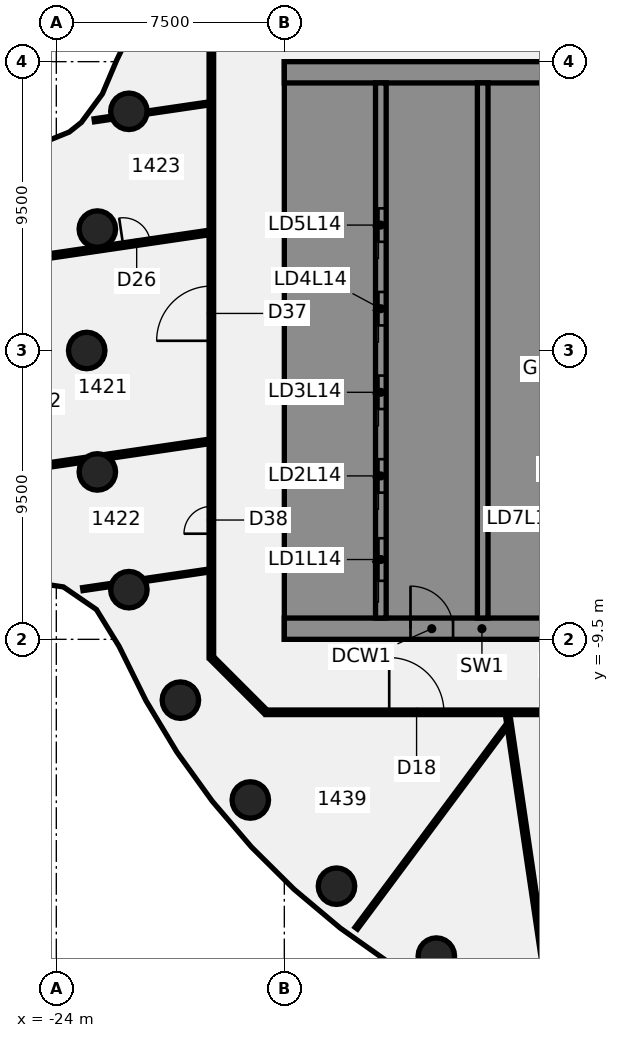
"""IFC4 building model, lengths in metres.
Left out: names, types, materials, properties, quantities, classifications, styles, units other than length and angle.
Written with IfcOpenShell. Run it as: python <this file> out.ifc"""

import sys

from ifc_helpers import new_model, si_unit, direction, frame, frame_2d, origin, origin_2d, place, context, subcontext, project, spatial, polyline, rectangle, circle, outline, extrude, element, fill, save


model = new_model("IFC4")
c1 = context("Model", 3, precision=1e-05, world=origin(), true_north=direction((0.0, 1.0)))
c2 = subcontext(c1, "Body", "Model", "MODEL_VIEW")
j1 = project(units=[si_unit("LENGTHUNIT", "METRE"), si_unit("PLANEANGLEUNIT", "RADIAN")], contexts=[c1])
p1 = place(None, origin())
s1 = spatial("IfcSite", under=j1, at=p1, CompositionType="ELEMENT")
p2 = place(p1, origin())
s2 = spatial("IfcBuilding", under=s1, at=p2, CompositionType="ELEMENT")
p3 = place(p2, frame((0.0, 0.0, 64.0)))
s3 = spatial("IfcBuildingStorey", under=s2, at=p3, CompositionType="ELEMENT", Elevation=64.0)
for number, where, z_axis, x_axis in (
    (1, (-21.613, 7.866, -0.14), (0.0, 0.0, 1.0), (1.0, 0.0, 0.0)),
    (2, (-22.651, 3.994, -0.14), (0.0, 0.0, 1.0), (1.0, 0.0, 0.0)),
    (3, (-23.0, 0.0, -0.14), (0.0, 0.0, 1.0), (1.0, 0.0, 0.0)),
    (4, (-22.651, -3.994, -0.14), (0.0, 0.0, 1.0), (1.0, 0.0, 0.0)),
    (5, (-21.613, -7.866, -0.14), (0.0, 0.0, 1.0), (1.0, 0.0, 0.0)),
    (6, (-19.919, -11.5, -0.14), (0.0, 0.0, 1.0), (1.0, 0.0, 0.0)),
    (7, (-17.619, -14.784, -0.14), (0.0, 0.0, 1.0), (1.0, 0.0, 0.0)),
    (8, (-14.784, -17.619, -0.14), (0.0, 0.0, 1.0), (1.0, 0.0, 0.0)),
    (9, (-11.5, -19.919, -0.14), (0.0, 0.0, 1.0), (1.0, 0.0, 0.0)),
):
    element("IfcColumn", number, at=place(p3, frame(where, z_axis=z_axis, x_axis=x_axis)), inside=s3, PredefinedType="COLUMN", context=c2, shape_type="SweptSolid", body=[
        extrude(circle(Radius=0.6, at=origin_2d()), origin(), (0.0, 0.0, 1.0), 3.75),
    ])
p4 = place(p3, frame((-9.156, -11.969, 0.0), z_axis=(0.0, 0.0, 1.0), x_axis=(0.145719234009, -0.989325985123, 0.0)))
e10 = element("IfcWall", 10, at=p4, inside=s3, PredefinedType="PARTITIONING", context=c2, shape_type="SweptSolid", body=[
    extrude(rectangle(XDim=9.143, YDim=0.15, at=frame_2d((4.571, 0.0))), origin(), (0.0, 0.0, 1.0), 3.01),
])
p5 = place(p3, frame((-18.872, -10.128, 0.0), z_axis=(0.0, 0.0, 1.0), x_axis=(0.707106781187, -0.707106781187, 0.0)))
e11 = element("IfcWall", 11, at=p5, inside=s3, PredefinedType="PARTITIONING", context=c2, shape_type="SweptSolid", body=[
    extrude(rectangle(XDim=2.465, YDim=0.15, at=frame_2d((1.232, 0.0))), origin(), (0.0, 0.0, 1.0), 3.01),
])
p6 = place(p3, frame((-17.1, -11.9, 0.0), z_axis=(0.0, 0.0, 1.0), x_axis=(1.0, 0.0, 0.0)))
e12 = element("IfcWall", 12, at=p6, inside=s3, PredefinedType="PARTITIONING", context=c2, shape_type="SweptSolid", body=[
    extrude(rectangle(XDim=34.165, YDim=0.15, at=frame_2d((17.083, 0.0))), origin(), (0.0, 0.0, 1.0), 3.01),
])
p7 = place(p6, frame((14.73, 0.0, 0.0)))
e13 = element("IfcOpeningElement", 13, at=p7, cuts=e12, PredefinedType="OPENING", context=c2, shape_type="SweptSolid", body=[
    extrude(rectangle(XDim=1.8, YDim=2.1, at=frame_2d((0.9, 1.05))), frame((0.0, 0.085, 0.0), z_axis=(0.0, -1.0, 0.0), x_axis=(1.0, 0.0, 0.0)), (0.0, 0.0, 1.0), 0.17),
])
p8 = place(p6, frame((4.05, 0.0, 0.0)))
e14 = element("IfcOpeningElement", 14, at=p8, cuts=e12, PredefinedType="OPENING", context=c2, shape_type="SweptSolid", body=[
    extrude(rectangle(XDim=1.8, YDim=2.1, at=frame_2d((0.9, 1.05))), frame((0.0, 0.085, 0.0), z_axis=(0.0, -1.0, 0.0), x_axis=(1.0, 0.0, 0.0)), (0.0, 0.0, 1.0), 0.17),
])
p9 = place(p6, frame((27.348, 0.0, 0.0)))
e15 = element("IfcOpeningElement", 15, at=p9, cuts=e12, PredefinedType="OPENING", context=c2, shape_type="SweptSolid", body=[
    extrude(rectangle(XDim=1.8, YDim=2.1, at=frame_2d((0.9, 1.05))), frame((0.0, 0.085, 0.0), z_axis=(0.0, -1.0, 0.0), x_axis=(1.0, 0.0, 0.0)), (0.0, 0.0, 1.0), 0.17),
])
p10 = place(p3, frame((-26.18, 2.822, 0.0), z_axis=(0.0, 0.0, 1.0), x_axis=(0.989369911443, 0.145420694304, 0.0)))
e16 = element("IfcWall", 16, at=p10, inside=s3, PredefinedType="PARTITIONING", context=c2, shape_type="SweptSolid", body=[
    extrude(rectangle(XDim=7.288, YDim=0.15, at=frame_2d((3.644, 0.0))), origin(), (0.0, 0.0, 1.0), 3.01),
])
p11 = place(p10, frame((4.425, 0.0, 0.0)))
e17 = element("IfcOpeningElement", 17, at=p11, cuts=e16, PredefinedType="OPENING", context=c2, shape_type="SweptSolid", body=[
    extrude(rectangle(XDim=0.9, YDim=2.1, at=frame_2d((0.45, 1.05))), frame((0.0, 0.085, 0.0), z_axis=(0.0, -1.0, 0.0), x_axis=(1.0, 0.0, 0.0)), (0.0, 0.0, 1.0), 0.17),
])
p12 = place(p3, frame((-25.186, -3.904, 0.0), z_axis=(0.0, 0.0, 1.0), x_axis=(0.989392222707, 0.145268818563, 0.0)))
e18 = element("IfcWall", 18, at=p12, inside=s3, PredefinedType="PARTITIONING", context=c2, shape_type="SweptSolid", body=[
    extrude(rectangle(XDim=2.123, YDim=0.15, at=frame_2d((1.061, 0.0))), origin(), (0.0, 0.0, 1.0), 3.01),
])
p13 = place(p3, frame((-22.327, -3.484, 0.0), z_axis=(0.0, 0.0, 1.0), x_axis=(0.989385008204, 0.145317946381, 0.0)))
e19 = element("IfcWall", 19, at=p13, inside=s3, PredefinedType="PARTITIONING", context=c2, shape_type="SweptSolid", body=[
    extrude(rectangle(XDim=3.394, YDim=0.15, at=frame_2d((1.697, 0.0))), origin(), (0.0, 0.0, 1.0), 3.01),
])
p14 = place(p3, frame((-23.128, -7.848, 0.0), z_axis=(0.0, 0.0, 1.0), x_axis=(0.989386100857, 0.145310506954, 0.0)))
e20 = element("IfcWall", 20, at=p14, inside=s3, PredefinedType="PARTITIONING", context=c2, shape_type="SweptSolid", body=[
    extrude(rectangle(XDim=0.958, YDim=0.1, at=frame_2d((0.479, 0.0))), origin(), (0.0, 0.0, 1.0), 3.01),
])
p15 = place(p3, frame((-21.097, -7.549, 0.0), z_axis=(0.0, 0.0, 1.0), x_axis=(0.989370639684, 0.145415739624, 0.0)))
e21 = element("IfcWall", 21, at=p15, inside=s3, PredefinedType="PARTITIONING", context=c2, shape_type="SweptSolid", body=[
    extrude(rectangle(XDim=2.156, YDim=0.1, at=frame_2d((1.078, 0.0))), origin(), (0.0, 0.0, 1.0), 3.01),
])
p16 = place(p3, frame((-22.751, 7.571, 0.0), z_axis=(0.0, 0.0, 1.0), x_axis=(0.98935388362, 0.145529697883, 0.0)))
e22 = element("IfcWall", 22, at=p16, inside=s3, PredefinedType="PARTITIONING", context=c2, shape_type="SweptSolid", body=[
    extrude(rectangle(XDim=0.591, YDim=0.1, at=frame_2d((0.295, 0.0))), origin(), (0.0, 0.0, 1.0), 3.01),
])
p17 = place(p3, frame((-21.014, 7.826, 0.0), z_axis=(0.0, 0.0, 1.0), x_axis=(0.989366120347, 0.145446484692, 0.0)))
e23 = element("IfcWall", 23, at=p17, inside=s3, PredefinedType="PARTITIONING", context=c2, shape_type="SweptSolid", body=[
    extrude(rectangle(XDim=2.071, YDim=0.1, at=frame_2d((1.036, 0.0))), origin(), (0.0, 0.0, 1.0), 3.01),
])
p18 = place(p3, frame((-14.133, -19.001, 0.0), z_axis=(0.0, 0.0, 1.0), x_axis=(0.596808955644, 0.80238336876, 0.0)))
e24 = element("IfcWall", 24, at=p18, inside=s3, PredefinedType="PARTITIONING", context=c2, shape_type="SweptSolid", body=[
    extrude(rectangle(XDim=8.275, YDim=0.1, at=frame_2d((4.138, 0.0))), origin(), (0.0, 0.0, 1.0), 3.01),
])
p19 = place(p3, frame((-18.9, -10.1, 0.0), z_axis=(0.0, 0.0, 1.0), x_axis=(0.0, 1.0, 0.0)))
e25 = element("IfcWall", 25, at=p19, inside=s3, PredefinedType="PARTITIONING", context=c2, shape_type="SweptSolid", body=[
    extrude(rectangle(XDim=20.2, YDim=0.15, at=frame_2d((10.1, 0.0))), origin(), (0.0, 0.0, 1.0), 3.01),
])
p20 = place(p19, frame((10.419, 0.0, 0.0)))
e26 = element("IfcOpeningElement", 26, at=p20, cuts=e25, PredefinedType="OPENING", context=c2, shape_type="SweptSolid", body=[
    extrude(rectangle(XDim=1.8, YDim=2.1, at=frame_2d((0.9, 1.05))), frame((0.0, 0.085, 0.0), z_axis=(0.0, -1.0, 0.0), x_axis=(1.0, 0.0, 0.0)), (0.0, 0.0, 1.0), 0.17),
])
p21 = place(p19, frame((4.074, 0.0, 0.0)))
e27 = element("IfcOpeningElement", 27, at=p21, cuts=e25, PredefinedType="OPENING", context=c2, shape_type="SweptSolid", body=[
    extrude(rectangle(XDim=0.9, YDim=2.1, at=frame_2d((0.45, 1.05))), frame((0.0, 0.085, 0.0), z_axis=(0.0, -1.0, 0.0), x_axis=(1.0, 0.0, 0.0)), (0.0, 0.0, 1.0), 0.17),
])
p22 = place(p3, frame((-16.5, -9.15, 0.0), z_axis=(0.0, 0.0, 1.0), x_axis=(1.0, 0.0, 0.0)))
e28 = element("IfcWall", 28, at=p22, inside=s3, PredefinedType="SHEAR", context=c2, shape_type="SweptSolid", body=[
    extrude(rectangle(XDim=13.0, YDim=0.7, at=frame_2d((6.5, 0.0))), origin(), (0.0, 0.0, 1.0), 3.61),
])
p23 = place(p22, frame((4.15, 0.0, 0.0)))
e29 = element("IfcOpeningElement", 29, at=p23, cuts=e28, PredefinedType="OPENING", context=c2, shape_type="SweptSolid", body=[
    extrude(rectangle(XDim=1.4, YDim=2.1, at=frame_2d((0.7, 1.05))), frame((0.0, 0.36, 0.0), z_axis=(0.0, -1.0, 0.0), x_axis=(1.0, 0.0, 0.0)), (0.0, 0.0, 1.0), 0.72),
])
p24 = place(p22, frame((10.125, 0.0, 0.0)))
e30 = element("IfcOpeningElement", 30, at=p24, cuts=e28, PredefinedType="OPENING", context=c2, shape_type="SweptSolid", body=[
    extrude(rectangle(XDim=1.4, YDim=2.1, at=frame_2d((0.7, 1.05))), frame((0.0, 0.36, 0.0), z_axis=(0.0, -1.0, 0.0), x_axis=(1.0, 0.0, 0.0)), (0.0, 0.0, 1.0), 0.72),
])
p25 = place(p3, origin())
e31 = element("IfcWall", 31, at=p25, inside=s3, PredefinedType="SHEAR", context=c2, shape_type="SweptSolid", body=[
    extrude(outline(polyline([(-13.5, -8.8), (-13.5, -8.125), (-15.8, -8.125), (-15.8, -5.625), (-13.5, -5.625), (-13.5, -5.375), (-15.8, -5.375), (-15.8, -2.875), (-13.5, -2.875), (-13.5, -2.625), (-15.8, -2.625), (-15.8, -0.125), (-13.5, -0.125), (-13.5, 0.125), (-15.8, 0.125), (-15.8, 2.625), (-13.5, 2.625), (-13.5, 2.875), (-15.8, 2.875), (-15.8, 5.375), (-13.5, 5.375), (-13.5, 5.625), (-15.8, 5.625), (-15.8, 8.125), (-13.5, 8.125), (-13.5, 8.8), (-15.8, 8.8), (-16.5, 8.8), (-16.5, -8.8), (-15.8, -8.8), (-13.5, -8.8)])), origin(), (0.0, 0.0, 1.0), 3.61),
])
p26 = place(p3, frame((-16.5, 9.15, 0.0), z_axis=(0.0, 0.0, 1.0), x_axis=(1.0, 0.0, 0.0)))
e32 = element("IfcWall", 32, at=p26, inside=s3, PredefinedType="SHEAR", context=c2, shape_type="SweptSolid", body=[
    extrude(rectangle(XDim=13.0, YDim=0.7, at=frame_2d((6.5, 0.0))), origin(), (0.0, 0.0, 1.0), 3.61),
])
p27 = place(p3, origin())
e33 = element("IfcWall", 33, at=p27, inside=s3, PredefinedType="SHEAR", context=c2, shape_type="SweptSolid", body=[
    extrude(outline(polyline([(-9.8, -5.375), (-9.8, -5.625), (-7.5, -5.625), (-7.15, -5.625), (-7.15, 8.8), (-7.5, 8.8), (-9.8, 8.8), (-9.8, 8.125), (-7.5, 8.125), (-7.5, 5.625), (-9.8, 5.625), (-9.8, 5.375), (-7.5, 5.375), (-7.5, 2.875), (-9.8, 2.875), (-9.8, 2.625), (-7.5, 2.625), (-7.5, 0.125), (-9.8, 0.125), (-9.8, -0.125), (-7.5, -0.125), (-7.5, -2.625), (-9.8, -2.625), (-9.8, -2.875), (-7.5, -2.875), (-7.5, -5.375), (-9.8, -5.375)])), origin(), (0.0, 0.0, 1.0), 3.61),
])
p28 = place(p3, origin())
e34 = element("IfcWall", 34, at=p28, inside=s3, PredefinedType="SHEAR", context=c2, shape_type="SweptSolid", body=[
    extrude(outline(polyline([(-7.5, -8.125), (-9.55, -8.125), (-9.55, -5.625), (-9.8, -5.625), (-9.8, -8.125), (-9.8, -8.8), (-7.5, -8.8), (-7.5, -8.125)])), origin(), (0.0, 0.0, 1.0), 3.61),
])
p29 = place(p3, frame((-13.325, -8.8, 0.0), z_axis=(0.0, 0.0, 1.0), x_axis=(0.0, 1.0, 0.0)))
e35 = element("IfcWall", 35, at=p29, inside=s3, PredefinedType="SHEAR", context=c2, shape_type="SweptSolid", body=[
    extrude(rectangle(XDim=17.6, YDim=0.35, at=frame_2d((8.8, 0.0))), origin(), (0.0, 0.0, 1.0), 3.61),
])
p30 = place(p29, frame((1.225, 0.0, 0.0)))
e36 = element("IfcOpeningElement", 36, at=p30, cuts=e35, PredefinedType="OPENING", context=c2, shape_type="SweptSolid", body=[
    extrude(rectangle(XDim=1.4, YDim=2.1, at=frame_2d((0.7, 1.05))), frame((0.0, 0.185, 0.0), z_axis=(0.0, -1.0, 0.0), x_axis=(1.0, 0.0, 0.0)), (0.0, 0.0, 1.0), 0.37),
])
p31 = place(p29, frame((4.125, 0.0, 0.0)))
e37 = element("IfcOpeningElement", 37, at=p31, cuts=e35, PredefinedType="OPENING", context=c2, shape_type="SweptSolid", body=[
    extrude(rectangle(XDim=1.1, YDim=2.1, at=frame_2d((0.55, 1.05))), frame((0.0, 0.185, 0.0), z_axis=(0.0, -1.0, 0.0), x_axis=(1.0, 0.0, 0.0)), (0.0, 0.0, 1.0), 0.37),
])
p32 = place(p29, frame((6.875, 0.0, 0.0)))
e38 = element("IfcOpeningElement", 38, at=p32, cuts=e35, PredefinedType="OPENING", context=c2, shape_type="SweptSolid", body=[
    extrude(rectangle(XDim=1.1, YDim=2.1, at=frame_2d((0.55, 1.05))), frame((0.0, 0.185, 0.0), z_axis=(0.0, -1.0, 0.0), x_axis=(1.0, 0.0, 0.0)), (0.0, 0.0, 1.0), 0.37),
])
p33 = place(p29, frame((9.625, 0.0, 0.0)))
e39 = element("IfcOpeningElement", 39, at=p33, cuts=e35, PredefinedType="OPENING", context=c2, shape_type="SweptSolid", body=[
    extrude(rectangle(XDim=1.1, YDim=2.1, at=frame_2d((0.55, 1.05))), frame((0.0, 0.185, 0.0), z_axis=(0.0, -1.0, 0.0), x_axis=(1.0, 0.0, 0.0)), (0.0, 0.0, 1.0), 0.37),
])
p34 = place(p29, frame((12.375, 0.0, 0.0)))
e40 = element("IfcOpeningElement", 40, at=p34, cuts=e35, PredefinedType="OPENING", context=c2, shape_type="SweptSolid", body=[
    extrude(rectangle(XDim=1.1, YDim=2.1, at=frame_2d((0.55, 1.05))), frame((0.0, 0.185, 0.0), z_axis=(0.0, -1.0, 0.0), x_axis=(1.0, 0.0, 0.0)), (0.0, 0.0, 1.0), 0.37),
])
p35 = place(p3, frame((-9.975, -8.8, 0.0), z_axis=(0.0, 0.0, 1.0), x_axis=(0.0, 1.0, 0.0)))
e41 = element("IfcWall", 41, at=p35, inside=s3, PredefinedType="SHEAR", context=c2, shape_type="SweptSolid", body=[
    extrude(rectangle(XDim=17.6, YDim=0.35, at=frame_2d((8.8, 0.0))), origin(), (0.0, 0.0, 1.0), 3.61),
])
p36 = place(p8, frame((1.8, 0.0, 0.0), z_axis=(0.0, 0.0, 1.0), x_axis=(-1.0, 0.0, 0.0)))
e42 = element("IfcDoor", 42, at=p36, inside=s3, OperationType="DOUBLE_DOOR_SINGLE_SWING", PredefinedType="DOOR", context=c2, shape_type="SweptSolid", body=[
    extrude(rectangle(XDim=1.8, YDim=2.1, at=frame_2d((0.9, 1.05))), frame((0.0, 0.025, 0.0), z_axis=(0.0, -1.0, 0.0), x_axis=(1.0, 0.0, 0.0)), (0.0, 0.0, 1.0), 0.05),
])
fill(e14, e42)
p37 = place(p11, origin())
e43 = element("IfcDoor", 43, at=p37, inside=s3, OperationType="SINGLE_SWING_LEFT", PredefinedType="DOOR", context=c2, shape_type="SweptSolid", body=[
    extrude(rectangle(XDim=0.9, YDim=2.1, at=frame_2d((0.45, 1.05))), frame((0.0, 0.025, 0.0), z_axis=(0.0, -1.0, 0.0), x_axis=(1.0, 0.0, 0.0)), (0.0, 0.0, 1.0), 0.05),
])
fill(e17, e43)
p38 = place(p20, frame((1.8, 0.0, 0.0), z_axis=(0.0, 0.0, 1.0), x_axis=(-1.0, 0.0, 0.0)))
e44 = element("IfcDoor", 44, at=p38, inside=s3, OperationType="DOUBLE_DOOR_SINGLE_SWING", PredefinedType="DOOR", context=c2, shape_type="SweptSolid", body=[
    extrude(rectangle(XDim=1.8, YDim=2.1, at=frame_2d((0.9, 1.05))), frame((0.0, 0.025, 0.0), z_axis=(0.0, -1.0, 0.0), x_axis=(1.0, 0.0, 0.0)), (0.0, 0.0, 1.0), 0.05),
])
fill(e26, e44)
p39 = place(p21, origin())
e45 = element("IfcDoor", 45, at=p39, inside=s3, OperationType="SINGLE_SWING_RIGHT", PredefinedType="DOOR", context=c2, shape_type="SweptSolid", body=[
    extrude(rectangle(XDim=0.9, YDim=2.1, at=frame_2d((0.45, 1.05))), frame((0.0, 0.025, 0.0), z_axis=(0.0, -1.0, 0.0), x_axis=(1.0, 0.0, 0.0)), (0.0, 0.0, 1.0), 0.05),
])
fill(e27, e45)
p40 = place(p23, origin())
e46 = element("IfcDoor", 46, at=p40, inside=s3, OperationType="SINGLE_SWING_LEFT", PredefinedType="DOOR", context=c2, shape_type="SweptSolid", body=[
    extrude(rectangle(XDim=1.4, YDim=2.1, at=frame_2d((0.7, 1.05))), frame((0.0, 0.025, 0.0), z_axis=(0.0, -1.0, 0.0), x_axis=(1.0, 0.0, 0.0)), (0.0, 0.0, 1.0), 0.05),
])
fill(e29, e46)
p41 = place(p30, origin())
e47 = element("IfcDoor", 47, at=p41, inside=s3, OperationType="SLIDING_TO_LEFT", PredefinedType="DOOR", context=c2, shape_type="SweptSolid", body=[
    extrude(rectangle(XDim=1.4, YDim=2.1, at=frame_2d((0.7, 1.05))), frame((0.0, 0.025, 0.0), z_axis=(0.0, -1.0, 0.0), x_axis=(1.0, 0.0, 0.0)), (0.0, 0.0, 1.0), 0.05),
])
fill(e36, e47)
p42 = place(p31, origin())
e48 = element("IfcDoor", 48, at=p42, inside=s3, OperationType="SLIDING_TO_LEFT", PredefinedType="DOOR", context=c2, shape_type="SweptSolid", body=[
    extrude(rectangle(XDim=1.1, YDim=2.1, at=frame_2d((0.55, 1.05))), frame((0.0, 0.025, 0.0), z_axis=(0.0, -1.0, 0.0), x_axis=(1.0, 0.0, 0.0)), (0.0, 0.0, 1.0), 0.05),
])
fill(e37, e48)
p43 = place(p32, origin())
e49 = element("IfcDoor", 49, at=p43, inside=s3, OperationType="SLIDING_TO_LEFT", PredefinedType="DOOR", context=c2, shape_type="SweptSolid", body=[
    extrude(rectangle(XDim=1.1, YDim=2.1, at=frame_2d((0.55, 1.05))), frame((0.0, 0.025, 0.0), z_axis=(0.0, -1.0, 0.0), x_axis=(1.0, 0.0, 0.0)), (0.0, 0.0, 1.0), 0.05),
])
fill(e38, e49)
p44 = place(p33, origin())
e50 = element("IfcDoor", 50, at=p44, inside=s3, OperationType="SLIDING_TO_LEFT", PredefinedType="DOOR", context=c2, shape_type="SweptSolid", body=[
    extrude(rectangle(XDim=1.1, YDim=2.1, at=frame_2d((0.55, 1.05))), frame((0.0, 0.025, 0.0), z_axis=(0.0, -1.0, 0.0), x_axis=(1.0, 0.0, 0.0)), (0.0, 0.0, 1.0), 0.05),
])
fill(e39, e50)
p45 = place(p34, origin())
e51 = element("IfcDoor", 51, at=p45, inside=s3, OperationType="SLIDING_TO_LEFT", PredefinedType="DOOR", context=c2, shape_type="SweptSolid", body=[
    extrude(rectangle(XDim=1.1, YDim=2.1, at=frame_2d((0.55, 1.05))), frame((0.0, 0.025, 0.0), z_axis=(0.0, -1.0, 0.0), x_axis=(1.0, 0.0, 0.0)), (0.0, 0.0, 1.0), 0.05),
])
fill(e40, e51)
save(model, sys.argv[1])
